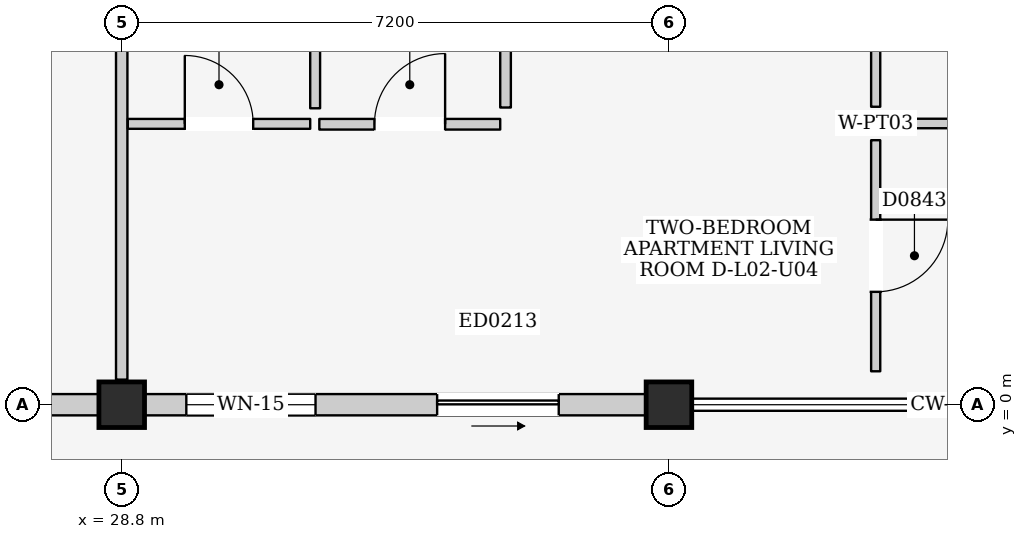
"""IFC4 building model, lengths in metres.
Left out: names, types, materials, properties, quantities, classifications, styles, units other than length and angle.
Written with IfcOpenShell. Run it as: python <this file> out.ifc"""

import sys

from ifc_helpers import new_model, si_unit, direction, frame, frame_2d, origin, origin_2d, place, context, subcontext, project, spatial, rectangle, extrude, element, fill, save


model = new_model("IFC4")
c1 = context("Model", 3, precision=1e-05, world=origin(), true_north=direction((0.0, 1.0)))
c2 = subcontext(c1, "Body", "Model", "MODEL_VIEW")
j1 = project(units=[si_unit("LENGTHUNIT", "METRE"), si_unit("PLANEANGLEUNIT", "RADIAN")], contexts=[c1])
p1 = place(None, origin())
s1 = spatial("IfcSite", under=j1, at=p1, CompositionType="ELEMENT")
p2 = place(p1, origin())
s2 = spatial("IfcBuilding", under=s1, at=p2, CompositionType="ELEMENT")
p3 = place(p2, frame((0.0, 0.0, 9.0)))
s3 = spatial("IfcBuildingStorey", under=s2, at=p3, CompositionType="ELEMENT", Elevation=9.0)
for number, where, z_axis, x_axis in (
    (1, (28.8, 0.0, 0.0), (0.0, 0.0, 1.0), (1.0, 0.0, 0.0)),
    (2, (36.0, 0.0, 0.0), (0.0, 0.0, 1.0), (1.0, 0.0, 0.0)),
):
    element("IfcColumn", number, at=place(p3, frame(where, z_axis=z_axis, x_axis=x_axis)), inside=s3, PredefinedType="COLUMN", context=c2, shape_type="SweptSolid", body=[
        extrude(rectangle(XDim=0.6, YDim=0.6, at=origin_2d()), origin(), (0.0, 0.0, 1.0), 3.2),
    ])
p4 = place(p3, frame((21.9, 0.0, 0.0), z_axis=(0.0, 0.0, 1.0), x_axis=(1.0, 0.0, 0.0)))
e3 = element("IfcWall", 3, at=p4, inside=s3, PredefinedType="ELEMENTEDWALL", context=c2, shape_type="SweptSolid", body=[
    extrude(rectangle(XDim=6.6, YDim=0.28, at=frame_2d((3.3, 0.0))), origin(), (0.0, 0.0, 1.0), 2.425),
])
p5 = place(p4, frame((3.85, 0.0, 0.0)))
e4 = element("IfcOpeningElement", 4, at=p5, cuts=e3, PredefinedType="OPENING", context=c2, shape_type="SweptSolid", body=[
    extrude(rectangle(XDim=1.8, YDim=2.12, at=frame_2d((0.9, 1.06))), frame((0.0, 0.155, 0.0), z_axis=(0.0, -1.0, 0.0), x_axis=(1.0, 0.0, 0.0)), (0.0, 0.0, 1.0), 0.31),
])
p6 = place(p4, frame((0.55, 0.0, 0.815)))
e5 = element("IfcOpeningElement", 5, at=p6, cuts=e3, PredefinedType="OPENING", context=c2, shape_type="SweptSolid", body=[
    extrude(rectangle(XDim=1.35, YDim=1.5, at=frame_2d((0.675, 0.75))), frame((0.0, 0.155, 0.0), z_axis=(0.0, -1.0, 0.0), x_axis=(1.0, 0.0, 0.0)), (0.0, 0.0, 1.0), 0.31),
])
p7 = place(p3, frame((29.1, 0.0, 0.0), z_axis=(0.0, 0.0, 1.0), x_axis=(1.0, 0.0, 0.0)))
e6 = element("IfcWall", 6, at=p7, inside=s3, PredefinedType="ELEMENTEDWALL", context=c2, shape_type="SweptSolid", body=[
    extrude(rectangle(XDim=6.6, YDim=0.28, at=frame_2d((3.3, 0.0))), origin(), (0.0, 0.0, 1.0), 2.425),
])
p8 = place(p7, frame((3.85, 0.0, 0.0)))
e7 = element("IfcOpeningElement", 7, at=p8, cuts=e6, PredefinedType="OPENING", context=c2, shape_type="SweptSolid", body=[
    extrude(rectangle(XDim=1.6, YDim=2.12, at=frame_2d((0.8, 1.06))), frame((0.0, 0.155, 0.0), z_axis=(0.0, -1.0, 0.0), x_axis=(1.0, 0.0, 0.0)), (0.0, 0.0, 1.0), 0.31),
])
p9 = place(p7, frame((0.55, 0.0, 0.865)))
e8 = element("IfcOpeningElement", 8, at=p9, cuts=e6, PredefinedType="OPENING", context=c2, shape_type="SweptSolid", body=[
    extrude(rectangle(XDim=1.7, YDim=1.45, at=frame_2d((0.85, 0.725))), frame((0.0, 0.155, 0.0), z_axis=(0.0, -1.0, 0.0), x_axis=(1.0, 0.0, 0.0)), (0.0, 0.0, 1.0), 0.31),
])
p10 = place(p3, frame((28.8, 0.33, 0.0), z_axis=(0.0, 0.0, 1.0), x_axis=(0.0, 1.0, 0.0)))
e9 = element("IfcWall", 9, at=p10, inside=s3, PredefinedType="PARTITIONING", context=c2, shape_type="SweptSolid", body=[
    extrude(rectangle(XDim=6.54, YDim=0.15, at=frame_2d((3.27, 0.0))), origin(), (0.0, 0.0, 1.0), 2.395),
])
p11 = place(p3, frame((28.88, 3.695, 0.0), z_axis=(0.0, 0.0, 1.0), x_axis=(1.0, 0.0, 0.0)))
e10 = element("IfcWall", 10, at=p11, inside=s3, PredefinedType="PARTITIONING", context=c2, shape_type="SweptSolid", body=[
    extrude(rectangle(XDim=2.4, YDim=0.13, at=frame_2d((1.2, 0.0))), origin(), (0.0, 0.0, 1.0), 2.96),
])
p12 = place(p11, frame((0.75, 0.0, 0.0)))
e11 = element("IfcOpeningElement", 11, at=p12, cuts=e10, PredefinedType="OPENING", context=c2, shape_type="SweptSolid", body=[
    extrude(rectangle(XDim=0.9, YDim=2.1, at=frame_2d((0.45, 1.05))), frame((0.0, 0.08, 0.0), z_axis=(0.0, -1.0, 0.0), x_axis=(1.0, 0.0, 0.0)), (0.0, 0.0, 1.0), 0.16),
])
p13 = place(p3, frame((31.345, 3.9, 0.0), z_axis=(0.0, 0.0, 1.0), x_axis=(0.0, 1.0, 0.0)))
e12 = element("IfcWall", 12, at=p13, inside=s3, PredefinedType="PARTITIONING", context=c2, shape_type="SweptSolid", body=[
    extrude(rectangle(XDim=3.04, YDim=0.13, at=frame_2d((1.52, 0.0))), origin(), (0.0, 0.0, 1.0), 2.96),
])
p14 = place(p3, frame((31.4, 3.69, 0.0), z_axis=(0.0, 0.0, 1.0), x_axis=(1.0, 0.0, 0.0)))
e13 = element("IfcWall", 13, at=p14, inside=s3, PredefinedType="PARTITIONING", context=c2, shape_type="SweptSolid", body=[
    extrude(rectangle(XDim=2.38, YDim=0.14, at=frame_2d((1.19, 0.0))), origin(), (0.0, 0.0, 1.0), 2.96),
])
p15 = place(p14, frame((0.725, 0.0, 0.0)))
e14 = element("IfcOpeningElement", 14, at=p15, cuts=e13, PredefinedType="OPENING", context=c2, shape_type="SweptSolid", body=[
    extrude(rectangle(XDim=0.93, YDim=2.14, at=frame_2d((0.465, 1.07))), frame((0.0, 0.085, 0.0), z_axis=(0.0, -1.0, 0.0), x_axis=(1.0, 0.0, 0.0)), (0.0, 0.0, 1.0), 0.17),
])
p16 = place(p3, frame((33.85, 3.91, 0.0), z_axis=(0.0, 0.0, 1.0), x_axis=(0.0, 1.0, 0.0)))
e15 = element("IfcWall", 15, at=p16, inside=s3, PredefinedType="PARTITIONING", context=c2, shape_type="SweptSolid", body=[
    extrude(rectangle(XDim=3.06, YDim=0.14, at=frame_2d((1.53, 0.0))), origin(), (0.0, 0.0, 1.0), 2.96),
])
p17 = place(p3, frame((38.72, 0.44, 0.0), z_axis=(0.0, 0.0, 1.0), x_axis=(0.0, 1.0, 0.0)))
e16 = element("IfcWall", 16, at=p17, inside=s3, PredefinedType="PARTITIONING", context=c2, shape_type="SweptSolid", body=[
    extrude(rectangle(XDim=3.04, YDim=0.12, at=frame_2d((1.52, 0.0))), origin(), (0.0, 0.0, 1.0), 2.96),
])
p18 = place(p17, frame((1.045, 0.0, 0.0)))
e17 = element("IfcOpeningElement", 17, at=p18, cuts=e16, PredefinedType="OPENING", context=c2, shape_type="SweptSolid", body=[
    extrude(rectangle(XDim=0.95, YDim=2.15, at=frame_2d((0.475, 1.075))), frame((0.0, 0.075, 0.0), z_axis=(0.0, -1.0, 0.0), x_axis=(1.0, 0.0, 0.0)), (0.0, 0.0, 1.0), 0.15),
])
p19 = place(p3, frame((38.92, 3.7, 0.0), z_axis=(0.0, 0.0, 1.0), x_axis=(1.0, 0.0, 0.0)))
e18 = element("IfcWall", 18, at=p19, inside=s3, PredefinedType="PARTITIONING", context=c2, shape_type="SweptSolid", body=[
    extrude(rectangle(XDim=4.06, YDim=0.125, at=frame_2d((2.03, 0.0))), origin(), (0.0, 0.0, 1.0), 2.96),
])
p20 = place(p3, frame((38.72, 3.92, 0.0), z_axis=(0.0, 0.0, 1.0), x_axis=(0.0, 1.0, 0.0)))
e19 = element("IfcWall", 19, at=p20, inside=s3, PredefinedType="PARTITIONING", context=c2, shape_type="SweptSolid", body=[
    extrude(rectangle(XDim=3.04, YDim=0.12, at=frame_2d((1.52, 0.0))), origin(), (0.0, 0.0, 1.0), 2.96),
])
p21 = place(p20, frame((1.04, 0.0, 0.0)))
e20 = element("IfcOpeningElement", 20, at=p21, cuts=e19, PredefinedType="OPENING", context=c2, shape_type="SweptSolid", body=[
    extrude(rectangle(XDim=0.96, YDim=2.15, at=frame_2d((0.48, 1.075))), frame((0.0, 0.075, 0.0), z_axis=(0.0, -1.0, 0.0), x_axis=(1.0, 0.0, 0.0)), (0.0, 0.0, 1.0), 0.15),
])
p22 = place(p8, frame((1.6, 0.0, 0.0), z_axis=(0.0, 0.0, 1.0), x_axis=(-1.0, 0.0, 0.0)))
e21 = element("IfcDoor", 21, at=p22, inside=s3, OperationType="SLIDING_TO_RIGHT", PredefinedType="DOOR", context=c2, shape_type="SweptSolid", body=[
    extrude(rectangle(XDim=1.6, YDim=2.12, at=frame_2d((0.8, 1.06))), frame((0.0, 0.025, 0.0), z_axis=(0.0, -1.0, 0.0), x_axis=(1.0, 0.0, 0.0)), (0.0, 0.0, 1.0), 0.05),
])
fill(e7, e21)
p23 = place(p9, origin())
e22 = element("IfcWindow", 22, at=p23, inside=s3, PartitioningType="DOUBLE_PANEL_VERTICAL", PredefinedType="WINDOW", context=c2, shape_type="SweptSolid", body=[
    extrude(rectangle(XDim=1.7, YDim=1.45, at=frame_2d((0.85, 0.725))), frame((0.0, 0.03, 0.0), z_axis=(0.0, -1.0, 0.0), x_axis=(1.0, 0.0, 0.0)), (0.0, 0.0, 1.0), 0.06),
])
fill(e8, e22)
p24 = place(p12, origin())
e23 = element("IfcDoor", 23, at=p24, inside=s3, OperationType="SINGLE_SWING_LEFT", PredefinedType="DOOR", context=c2, shape_type="SweptSolid", body=[
    extrude(rectangle(XDim=0.9, YDim=2.1, at=frame_2d((0.45, 1.05))), frame((0.0, 0.025, 0.0), z_axis=(0.0, -1.0, 0.0), x_axis=(1.0, 0.0, 0.0)), (0.0, 0.0, 1.0), 0.05),
])
fill(e11, e23)
p25 = place(p15, origin())
e24 = element("IfcDoor", 24, at=p25, inside=s3, OperationType="SINGLE_SWING_RIGHT", PredefinedType="DOOR", context=c2, shape_type="SweptSolid", body=[
    extrude(rectangle(XDim=0.93, YDim=2.14, at=frame_2d((0.465, 1.07))), frame((0.0, 0.025, 0.0), z_axis=(0.0, -1.0, 0.0), x_axis=(1.0, 0.0, 0.0)), (0.0, 0.0, 1.0), 0.05),
])
fill(e14, e24)
p26 = place(p18, frame((0.95, 0.0, 0.0), z_axis=(0.0, 0.0, 1.0), x_axis=(-1.0, 0.0, 0.0)))
e25 = element("IfcDoor", 25, at=p26, inside=s3, OperationType="SINGLE_SWING_LEFT", PredefinedType="DOOR", context=c2, shape_type="SweptSolid", body=[
    extrude(rectangle(XDim=0.95, YDim=2.15, at=frame_2d((0.475, 1.075))), frame((0.0, 0.025, 0.0), z_axis=(0.0, -1.0, 0.0), x_axis=(1.0, 0.0, 0.0)), (0.0, 0.0, 1.0), 0.05),
])
fill(e17, e25)
save(model, sys.argv[1])
